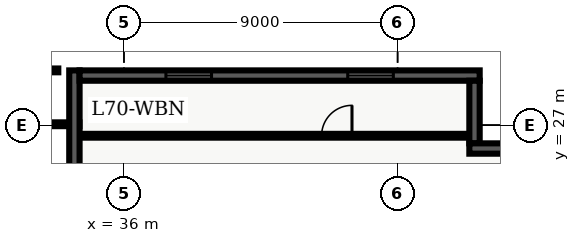
"""IFC4 building model, lengths in metres.
Left out: names, types, materials, properties, quantities, classifications, styles, units other than length and angle.
Written with IfcOpenShell. Run it as: python <this file> out.ifc"""

import sys

from ifc_helpers import new_model, entity, si_unit, converted_unit, direction, frame, origin_with_axes, origin_2d_with_axis, place, context, subcontext, project, spatial, polyline, rectangle, outline, extrude, element, fill, save


model = new_model("IFC4")
c1 = context("Model", 3, precision=1e-05, world=origin_with_axes(), true_north=direction((0.0, 1.0)))
c2 = subcontext(c1, "Body", "Model", "MODEL_VIEW")
j1 = project(units=[si_unit("LENGTHUNIT", "METRE"), converted_unit("PLANEANGLEUNIT", "DEGREE", entity("IfcPlaneAngleMeasure", 0.017), si_unit("PLANEANGLEUNIT", "RADIAN"), dimensions=[0, 0, 0, 0, 0, 0, 0])], contexts=[c1])
p1 = place(None, origin_with_axes())
s1 = spatial("IfcSite", under=j1, at=p1, CompositionType="ELEMENT")
p2 = place(p1, origin_with_axes())
s2 = spatial("IfcBuilding", under=s1, at=p2, CompositionType="ELEMENT")
p3 = place(p2, frame((0.0, 0.0, 284.1), z_axis=(0.0, 0.0, 1.0), x_axis=(1.0, 0.0, 0.0)))
s3 = spatial("IfcBuildingStorey", under=s2, at=p3, CompositionType="ELEMENT", Elevation=284.1)
p4 = place(p3, frame((20.45, 27.028, 0.0), z_axis=(0.0, 0.0, 1.0), x_axis=(1.0, 0.0, 0.0)))
e1 = element("IfcWall", 1, at=p4, inside=s3, PredefinedType="PARTITIONING", context=c2, shape_type="SweptSolid", body=[
    extrude(outline(polyline([(0.0, -0.062), (14.085, -0.062), (14.085, 0.062), (0.0, 0.062), (0.0, -0.062)])), origin_with_axes(), (0.0, 0.0, 1.0), 2.64),
])
p5 = place(p4, frame((2.975, 0.0, 0.0), z_axis=(0.0, 0.0, 1.0), x_axis=(1.0, 0.0, 0.0)))
e2 = element("IfcOpeningElement", 2, at=p5, cuts=e1, PredefinedType="OPENING", context=c2, shape_type="SweptSolid", body=[
    extrude(rectangle(XDim=0.95, YDim=0.145, at=origin_2d_with_axis()), origin_with_axes(), (0.0, 0.0, 1.0), 2.15),
])
p6 = place(p3, frame((27.78, 28.8, 0.0), z_axis=(0.0, 0.0, 1.0), x_axis=(1.0, 0.0, 0.0)))
e3 = element("IfcWall", 3, at=p6, inside=s3, PredefinedType="PARTITIONING", context=c2, shape_type="SweptSolid", body=[
    extrude(outline(polyline([(0.0, -0.062), (6.06, -0.062), (6.06, 0.062), (0.0, 0.062), (0.0, -0.062)])), origin_with_axes(), (0.0, 0.0, 1.0), 2.64),
])
p7 = place(p3, frame((34.535, 26.65, 0.0), z_axis=(0.0, 0.0, 1.0), x_axis=(1.0, 0.0, 0.0)))
e4 = element("IfcWall", 4, at=p7, inside=s3, PredefinedType="PARTITIONING", context=c2, shape_type="SweptSolid", body=[
    extrude(outline(polyline([(0.0, -0.062), (12.995, -0.062), (12.995, 0.062), (0.0, 0.062), (0.0, -0.062)])), origin_with_axes(), (0.0, 0.0, 1.0), 2.64),
])
p8 = place(p7, frame((8.465, 0.0, 0.0), z_axis=(0.0, 0.0, 1.0), x_axis=(1.0, 0.0, 0.0)))
e5 = element("IfcOpeningElement", 5, at=p8, cuts=e4, PredefinedType="OPENING", context=c2, shape_type="SweptSolid", body=[
    extrude(rectangle(XDim=1.0, YDim=0.145, at=origin_2d_with_axis()), origin_with_axes(), (0.0, 0.0, 1.0), 2.15),
])
p9 = place(p3, frame((34.37, 21.26, 0.0), z_axis=(0.0, 0.0, 1.0), x_axis=(0.0, 1.0, 0.0)))
e6 = element("IfcWall", 6, at=p9, inside=s3, PredefinedType="SOLIDWALL", context=c2, shape_type="SweptSolid", body=[
    extrude(outline(polyline([(0.0, -0.17), (7.54, -0.17), (7.54, 0.17), (0.0, 0.17), (0.0, -0.17)])), origin_with_axes(), (0.0, 0.0, 1.0), 3.6),
])
p10 = place(p3, frame((34.54, 28.63, 0.0), z_axis=(0.0, 0.0, 1.0), x_axis=(1.0, 0.0, 0.0)))
e7 = element("IfcWall", 7, at=p10, inside=s3, PredefinedType="SOLIDWALL", context=c2, shape_type="SweptSolid", body=[
    extrude(outline(polyline([(0.0, -0.17), (13.16, -0.17), (13.16, 0.17), (0.0, 0.17), (0.0, -0.17)])), origin_with_axes(), (0.0, 0.0, 1.0), 3.6),
])
p11 = place(p10, frame((3.59, 0.0, 0.45), z_axis=(0.0, 0.0, 1.0), x_axis=(1.0, 0.0, 0.0)))
e8 = element("IfcOpeningElement", 8, at=p11, cuts=e7, PredefinedType="OPENING", context=c2, shape_type="SweptSolid", body=[
    extrude(rectangle(XDim=1.5, YDim=0.36, at=origin_2d_with_axis()), origin_with_axes(), (0.0, 0.0, 1.0), 2.1),
])
p12 = place(p10, frame((9.57, 0.0, 0.45), z_axis=(0.0, 0.0, 1.0), x_axis=(1.0, 0.0, 0.0)))
e9 = element("IfcOpeningElement", 9, at=p12, cuts=e7, PredefinedType="OPENING", context=c2, shape_type="SweptSolid", body=[
    extrude(rectangle(XDim=1.5, YDim=0.36, at=origin_2d_with_axis()), origin_with_axes(), (0.0, 0.0, 1.0), 2.1),
])
p13 = place(p3, frame((47.53, 28.46, 0.0), z_axis=(0.0, 0.0, 1.0), x_axis=(0.0, -1.0, 0.0)))
e10 = element("IfcWall", 10, at=p13, inside=s3, PredefinedType="SOLIDWALL", context=c2, shape_type="SweptSolid", body=[
    extrude(outline(polyline([(0.0, -0.17), (2.06, -0.17), (2.06, 0.17), (0.0, 0.17), (0.0, -0.17)])), origin_with_axes(), (0.0, 0.0, 1.0), 3.6),
])
p14 = place(p3, frame((47.36, 26.23, 0.0), z_axis=(0.0, 0.0, 1.0), x_axis=(1.0, 0.0, 0.0)))
e11 = element("IfcWall", 11, at=p14, inside=s3, PredefinedType="SOLIDWALL", context=c2, shape_type="SweptSolid", body=[
    extrude(outline(polyline([(0.0, -0.17), (2.74, -0.17), (2.74, 0.17), (0.0, 0.17), (0.0, -0.17)])), origin_with_axes(), (0.0, 0.0, 1.0), 3.6),
])
p15 = place(p7, frame((8.465, 0.0, 0.0), z_axis=(0.0, 0.0, 1.0), x_axis=(1.0, 0.0, 0.0)))
e12 = element("IfcDoor", 12, at=p15, inside=s3, OperationType="SINGLE_SWING_RIGHT", PredefinedType="DOOR", context=c2, shape_type="SweptSolid", body=[
    extrude(rectangle(XDim=1.0, YDim=0.075, at=origin_2d_with_axis()), origin_with_axes(), (0.0, 0.0, 1.0), 2.15),
])
fill(e5, e12)
p16 = place(p10, frame((3.59, 0.0, 0.45), z_axis=(0.0, 0.0, 1.0), x_axis=(1.0, 0.0, 0.0)))
e13 = element("IfcWindow", 13, at=p16, inside=s3, PredefinedType="WINDOW", context=c2, shape_type="SweptSolid", body=[
    extrude(rectangle(XDim=1.5, YDim=0.09, at=origin_2d_with_axis()), origin_with_axes(), (0.0, 0.0, 1.0), 2.1),
])
fill(e8, e13)
p17 = place(p10, frame((9.57, 0.0, 0.45), z_axis=(0.0, 0.0, 1.0), x_axis=(1.0, 0.0, 0.0)))
e14 = element("IfcWindow", 14, at=p17, inside=s3, PredefinedType="WINDOW", context=c2, shape_type="SweptSolid", body=[
    extrude(rectangle(XDim=1.5, YDim=0.09, at=origin_2d_with_axis()), origin_with_axes(), (0.0, 0.0, 1.0), 2.1),
])
fill(e9, e14)
save(model, sys.argv[1])
